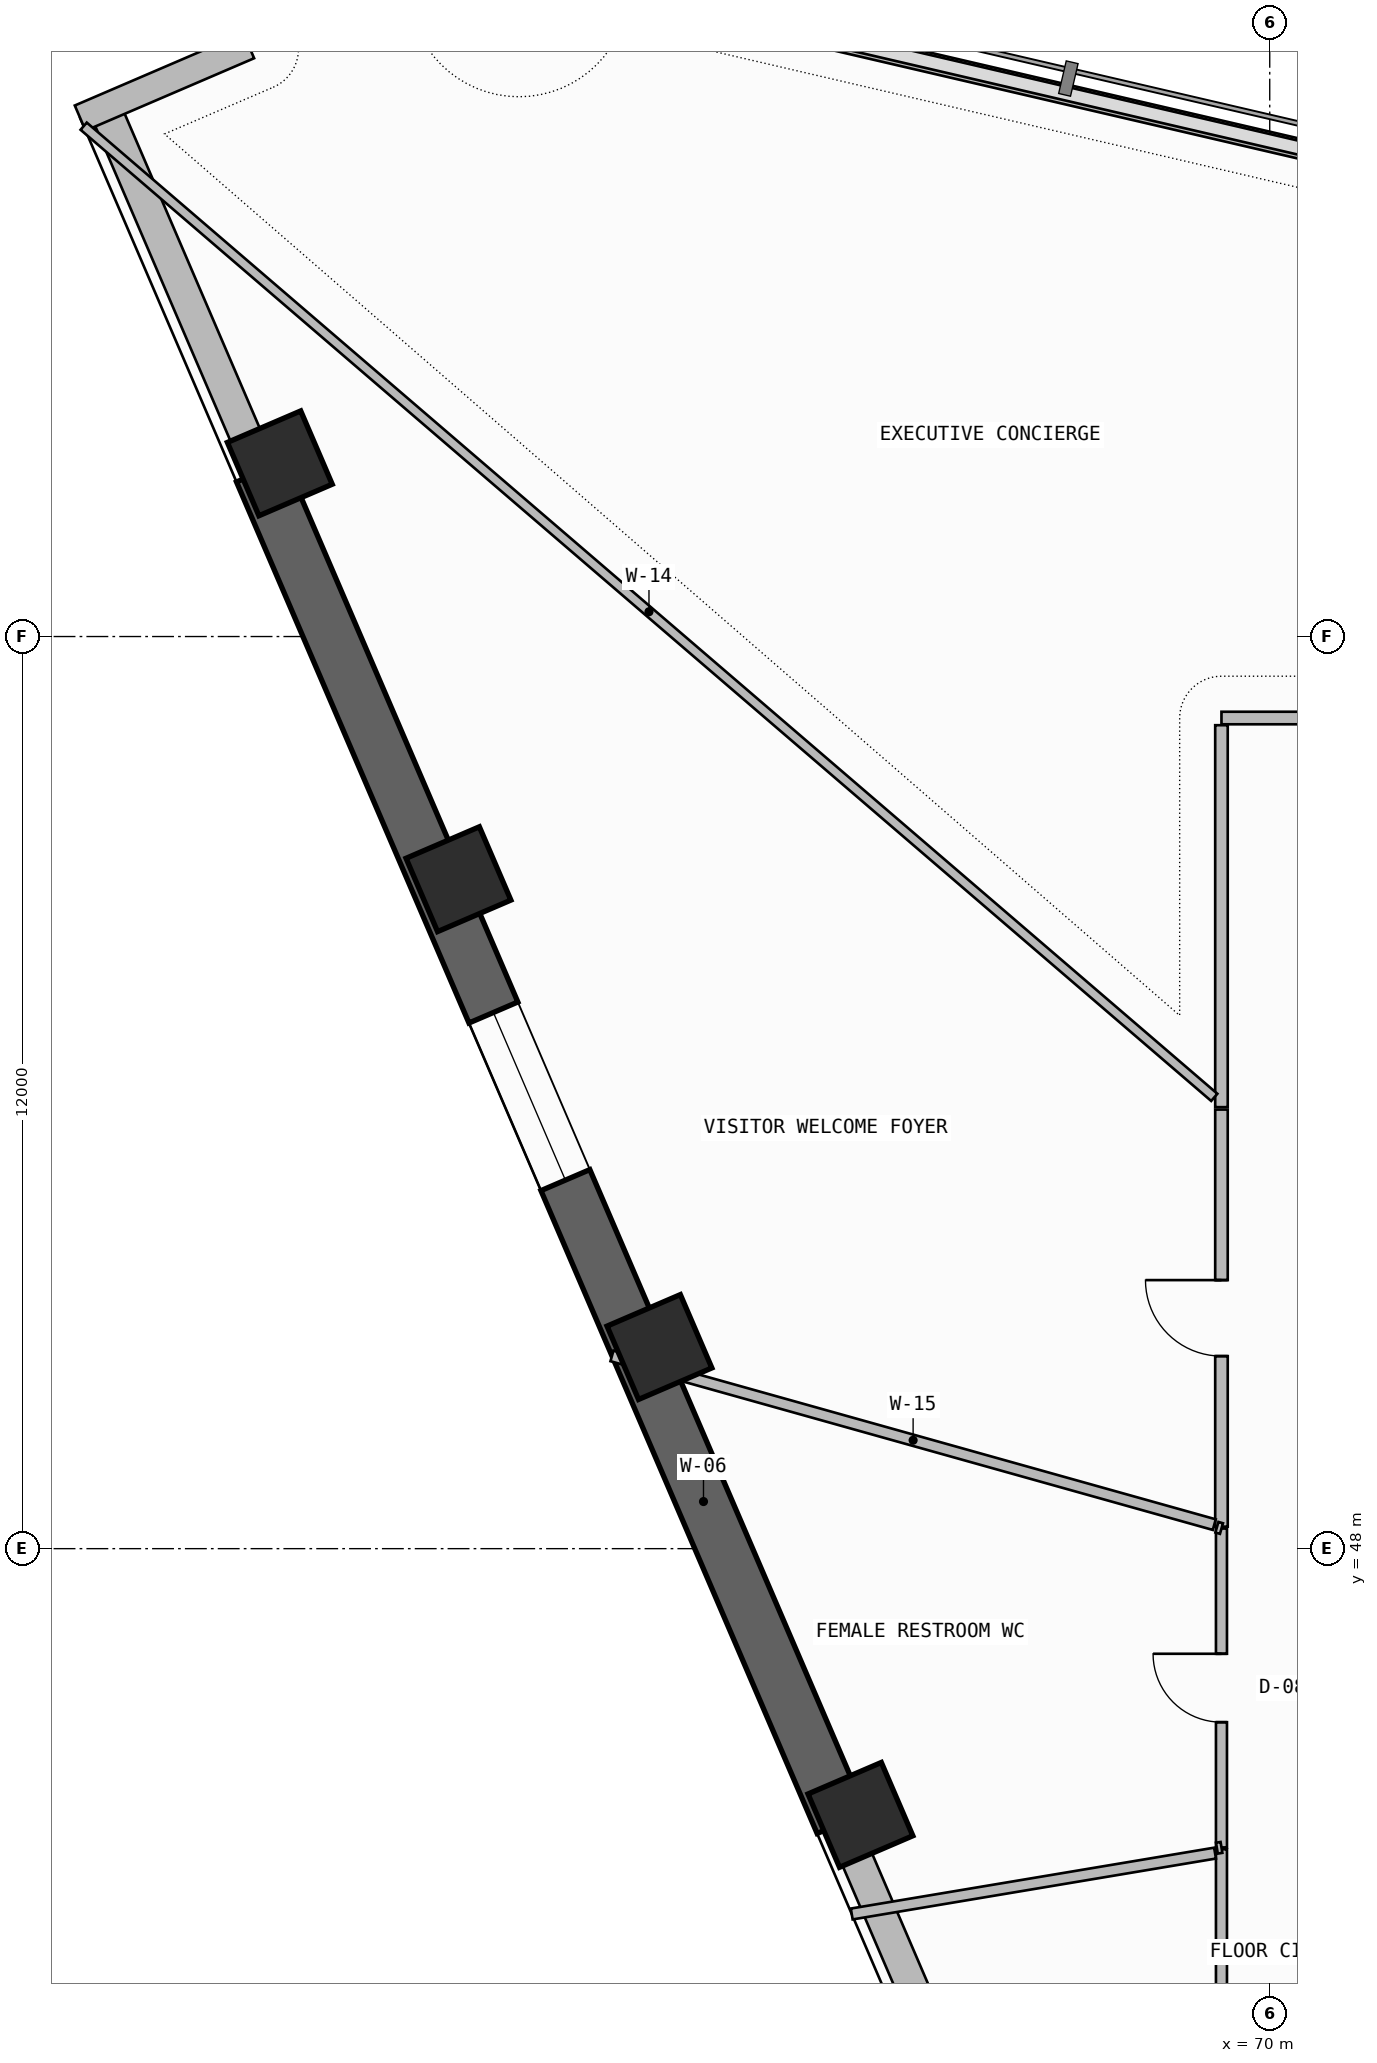
"""IFC4 building model, lengths in metres.
Left out: names, types, materials, properties, quantities, classifications, styles, units other than length and angle.
Written with IfcOpenShell. Run it as: python <this file> out.ifc"""

import sys

from ifc_helpers import new_model, si_unit, direction, frame, frame_2d, origin, origin_2d, place, context, subcontext, project, spatial, rectangle, extrude, element, fill, save


model = new_model("IFC4")
c1 = context("Model", 3, precision=1e-05, world=origin(), true_north=direction((0.0, 1.0)))
c2 = subcontext(c1, "Body", "Model", "MODEL_VIEW")
j1 = project(units=[si_unit("LENGTHUNIT", "METRE"), si_unit("PLANEANGLEUNIT", "RADIAN")], contexts=[c1])
p1 = place(None, origin())
s1 = spatial("IfcSite", under=j1, at=p1, CompositionType="ELEMENT")
p2 = place(p1, origin())
s2 = spatial("IfcBuilding", under=s1, at=p2, CompositionType="ELEMENT")
p3 = place(p2, frame((0.0, 0.0, 175.5)))
s3 = spatial("IfcBuildingStorey", under=s2, at=p3, CompositionType="ELEMENT", Elevation=175.5)
for number, where, z_axis, x_axis in (
    (1, (56.976, 62.279, 0.0), (0.0, 0.0, 1.0), (-0.395, 0.919, 0.0)),
    (2, (59.326, 56.807, 0.0), (0.0, 0.0, 1.0), (-0.395, 0.919, 0.0)),
    (3, (61.97, 50.653, 0.0), (0.0, 0.0, 1.0), (-0.395, 0.919, 0.0)),
    (4, (64.615, 44.498, 0.0), (0.0, 0.0, 1.0), (-0.395, 0.919, 0.0)),
):
    element("IfcColumn", number, at=place(p3, frame(where, z_axis=z_axis, x_axis=x_axis)), inside=s3, PredefinedType="COLUMN", context=c2, shape_type="SweptSolid", body=[
        extrude(rectangle(XDim=1.05, YDim=1.05, at=origin_2d()), origin(), (0.0, 0.0, 1.0), 3.6),
    ])
p4 = place(p3, frame((54.671, 66.959, 0.0), z_axis=(0.0, 0.0, 1.0), x_axis=(0.394733507229, -0.918795656428, 0.0)))
e5 = element("IfcWall", 5, at=p4, inside=s3, PredefinedType="SOLIDWALL", context=c2, shape_type="SweptSolid", body=[
    extrude(rectangle(XDim=5.21, YDim=0.42, at=frame_2d((2.605, 0.0))), origin(), (0.0, 0.0, 1.0), 2.725),
])
p5 = place(p3, frame((56.728, 62.172, -0.26), z_axis=(0.0, 0.0, 1.0), x_axis=(0.394736752992, -0.918794261974, 0.0)))
e6 = element("IfcWall", 6, at=p5, inside=s3, PredefinedType="SHEAR", context=c2, shape_type="SweptSolid", body=[
    extrude(rectangle(XDim=19.353, YDim=0.7, at=frame_2d((9.676, 0.0))), origin(), (0.0, 0.0, 1.0), 3.6),
])
p6 = place(p5, frame((7.747, 0.0, 1.2)))
e7 = element("IfcOpeningElement", 7, at=p6, cuts=e6, PredefinedType="OPENING", context=c2, shape_type="SweptSolid", body=[
    extrude(rectangle(XDim=2.4, YDim=0.9, at=frame_2d((1.2, 0.45))), frame((0.0, 0.36, 0.0), z_axis=(0.0, -1.0, 0.0), x_axis=(1.0, 0.0, 0.0)), (0.0, 0.0, 1.0), 0.72),
])
p7 = place(p3, frame((64.367, 44.391, 0.0), z_axis=(0.0, 0.0, 1.0), x_axis=(0.394757430431, -0.918785378159, 0.0)))
e8 = element("IfcWall", 8, at=p7, inside=s3, PredefinedType="SOLIDWALL", context=c2, shape_type="SweptSolid", body=[
    extrude(rectangle(XDim=12.654, YDim=0.42, at=frame_2d((6.327, 0.0))), origin(), (0.0, 0.0, 1.0), 2.725),
])
p8 = place(p7, frame((3.193, 0.0, 1.2)))
e9 = element("IfcOpeningElement", 9, at=p8, cuts=e8, PredefinedType="OPENING", context=c2, shape_type="SweptSolid", body=[
    extrude(rectangle(XDim=2.4, YDim=0.9, at=frame_2d((1.2, 0.45))), frame((0.0, 0.22, 0.0), z_axis=(0.0, -1.0, 0.0), x_axis=(1.0, 0.0, 0.0)), (0.0, 0.0, 1.0), 0.44),
])
p9 = place(p3, frame((56.566, 67.773, 0.0), z_axis=(0.0, 0.0, 1.0), x_axis=(-0.918788830096, -0.394749396062, 0.0)))
e10 = element("IfcWall", 10, at=p9, inside=s3, PredefinedType="SOLIDWALL", context=c2, shape_type="SweptSolid", body=[
    extrude(rectangle(XDim=2.413, YDim=0.36, at=frame_2d((1.207, 0.0))), origin(), (0.0, 0.0, 1.0), 3.34),
])
p10 = place(p3, frame((87.165, 62.482, 0.0), z_axis=(0.0, 0.0, 1.0), x_axis=(-0.973958631559, 0.226725790352, 0.0)))
e11 = element("IfcWall", 11, at=p10, inside=s3, PredefinedType="PARAPET", context=c2, shape_type="SweptSolid", body=[
    extrude(rectangle(XDim=27.376, YDim=0.2, at=frame_2d((13.688, 0.0))), origin(), (0.0, 0.0, 1.0), 1.15),
])
p11 = place(p3, frame((69.365, 44.045, 0.0), z_axis=(0.0, 0.0, 1.0), x_axis=(0.0, -1.0, 0.0)))
e12 = element("IfcWall", 12, at=p11, inside=s3, PredefinedType="PARTITIONING", context=c2, shape_type="SweptSolid", body=[
    extrude(rectangle(XDim=7.995, YDim=0.145, at=frame_2d((3.997, 0.0))), origin(), (0.0, 0.0, 1.0), 3.34),
])
p12 = place(p11, frame((2.543, 0.0, 0.0)))
e13 = element("IfcOpeningElement", 13, at=p12, cuts=e12, PredefinedType="OPENING", context=c2, shape_type="SweptSolid", body=[
    extrude(rectangle(XDim=0.9, YDim=2.1, at=frame_2d((0.45, 1.05))), frame((0.0, 0.083, 0.0), z_axis=(0.0, -1.0, 0.0), x_axis=(1.0, 0.0, 0.0)), (0.0, 0.0, 1.0), 0.165),
])
p13 = place(p3, frame((64.5, 43.194, 0.0), z_axis=(0.0, 0.0, 1.0), x_axis=(0.986257448723, 0.165215752391, 0.0)))
e14 = element("IfcWall", 14, at=p13, inside=s3, PredefinedType="PARTITIONING", context=c2, shape_type="SweptSolid", body=[
    extrude(rectangle(XDim=4.847, YDim=0.145, at=frame_2d((2.423, 0.0))), origin(), (0.0, 0.0, 1.0), 3.34),
])
p14 = place(p3, frame((77.644, 58.928, 0.0), z_axis=(0.0, 0.0, 1.0), x_axis=(-1.0, 0.0, 0.0)))
e15 = element("IfcWall", 15, at=p14, inside=s3, PredefinedType="PARTITIONING", context=c2, shape_type="SweptSolid", body=[
    extrude(rectangle(XDim=8.279, YDim=0.165, at=frame_2d((4.14, 0.0))), origin(), (0.0, 0.0, 1.0), 2.825),
])
p15 = place(p14, frame((2.608, 0.0, 0.0)))
e16 = element("IfcOpeningElement", 16, at=p15, cuts=e15, PredefinedType="OPENING", context=c2, shape_type="SweptSolid", body=[
    extrude(rectangle(XDim=1.0, YDim=2.2, at=frame_2d((0.5, 1.1))), frame((0.0, 0.093, 0.0), z_axis=(0.0, -1.0, 0.0), x_axis=(1.0, 0.0, 0.0)), (0.0, 0.0, 1.0), 0.185),
])
p16 = place(p3, frame((69.365, 58.833, 0.0), z_axis=(0.0, 0.0, 1.0), x_axis=(0.0, -1.0, 0.0)))
e17 = element("IfcWall", 17, at=p16, inside=s3, PredefinedType="PARTITIONING", context=c2, shape_type="SweptSolid", body=[
    extrude(rectangle(XDim=5.025, YDim=0.165, at=frame_2d((2.513, 0.0))), origin(), (0.0, 0.0, 1.0), 2.825),
])
p17 = place(p3, frame((69.271, 53.937, 0.0), z_axis=(0.0, 0.0, 1.0), x_axis=(-0.758583892444, 0.651575381767, 0.0)))
e18 = element("IfcWall", 18, at=p17, inside=s3, PredefinedType="PARTITIONING", context=c2, shape_type="SweptSolid", body=[
    extrude(rectangle(XDim=19.61, YDim=0.125, at=frame_2d((9.805, 0.0))), origin(), (0.0, 0.0, 1.0), 2.725),
])
p18 = place(p3, frame((69.365, 53.777, 0.0), z_axis=(0.0, 0.0, 1.0), x_axis=(0.0, -1.0, 0.0)))
e19 = element("IfcWall", 19, at=p18, inside=s3, PredefinedType="PARTITIONING", context=c2, shape_type="SweptSolid", body=[
    extrude(rectangle(XDim=5.487, YDim=0.165, at=frame_2d((2.744, 0.0))), origin(), (0.0, 0.0, 1.0), 2.825),
])
p19 = place(p18, frame((2.243, 0.0, 0.0)))
e20 = element("IfcOpeningElement", 20, at=p19, cuts=e19, PredefinedType="OPENING", context=c2, shape_type="SweptSolid", body=[
    extrude(rectangle(XDim=1.0, YDim=2.2, at=frame_2d((0.5, 1.1))), frame((0.0, 0.093, 0.0), z_axis=(0.0, -1.0, 0.0), x_axis=(1.0, 0.0, 0.0)), (0.0, 0.0, 1.0), 0.185),
])
p20 = place(p3, frame((69.271, 48.316, 0.0), z_axis=(0.0, 0.0, 1.0), x_axis=(-0.962939367868, 0.269717952331, 0.0)))
e21 = element("IfcWall", 21, at=p20, inside=s3, PredefinedType="PARTITIONING", context=c2, shape_type="SweptSolid", body=[
    extrude(rectangle(XDim=8.23, YDim=0.145, at=frame_2d((4.115, 0.0))), origin(), (0.0, 0.0, 1.0), 2.725),
])
p21 = place(p3, frame((69.365, 48.265, 0.0), z_axis=(0.0, 0.0, 1.0), x_axis=(0.0, -1.0, 0.0)))
e22 = element("IfcWall", 22, at=p21, inside=s3, PredefinedType="PARTITIONING", context=c2, shape_type="SweptSolid", body=[
    extrude(rectangle(XDim=4.195, YDim=0.145, at=frame_2d((2.098, 0.0))), origin(), (0.0, 0.0, 1.0), 3.34),
])
p22 = place(p21, frame((1.648, 0.0, 0.0)))
e23 = element("IfcOpeningElement", 23, at=p22, cuts=e22, PredefinedType="OPENING", context=c2, shape_type="SweptSolid", body=[
    extrude(rectangle(XDim=0.9, YDim=2.1, at=frame_2d((0.45, 1.05))), frame((0.0, 0.083, 0.0), z_axis=(0.0, -1.0, 0.0), x_axis=(1.0, 0.0, 0.0)), (0.0, 0.0, 1.0), 0.165),
])
p23 = place(p3, frame((69.305, 48.282, 0.0), z_axis=(0.0, 0.0, 1.0), x_axis=(0.961818474576, -0.273688183822, 0.0)))
e24 = element("IfcWall", 24, at=p23, inside=s3, PredefinedType="PARTITIONING", context=c2, shape_type="SweptSolid", body=[
    extrude(rectangle(XDim=0.062, YDim=0.145, at=frame_2d((0.031, 0.0))), origin(), (0.0, 0.0, 1.0), 3.34),
])
p24 = place(p3, frame((69.365, 44.069, 0.0), z_axis=(0.0, 0.0, 1.0), x_axis=(-0.987036848987, -0.160493796583, 0.0)))
e25 = element("IfcWall", 25, at=p24, inside=s3, PredefinedType="PARTITIONING", context=c2, shape_type="SweptSolid", body=[
    extrude(rectangle(XDim=0.061, YDim=0.145, at=frame_2d((0.03, 0.0))), origin(), (0.0, 0.0, 1.0), 3.34),
])
p25 = place(p6, origin())
e26 = element("IfcWindow", 26, at=p25, inside=s3, PartitioningType="SINGLE_PANEL", PredefinedType="WINDOW", context=c2, shape_type="SweptSolid", body=[
    extrude(rectangle(XDim=2.4, YDim=0.9, at=frame_2d((1.2, 0.45))), frame((0.0, 0.03, 0.0), z_axis=(0.0, -1.0, 0.0), x_axis=(1.0, 0.0, 0.0)), (0.0, 0.0, 1.0), 0.06),
])
fill(e7, e26)
p26 = place(p19, frame((1.0, 0.0, 0.0), z_axis=(0.0, 0.0, 1.0), x_axis=(-1.0, 0.0, 0.0)))
e27 = element("IfcDoor", 27, at=p26, inside=s3, OperationType="SINGLE_SWING_RIGHT", PredefinedType="DOOR", context=c2, shape_type="SweptSolid", body=[
    extrude(rectangle(XDim=1.0, YDim=2.2, at=frame_2d((0.5, 1.1))), frame((0.0, 0.025, 0.0), z_axis=(0.0, -1.0, 0.0), x_axis=(1.0, 0.0, 0.0)), (0.0, 0.0, 1.0), 0.05),
])
fill(e20, e27)
p27 = place(p22, frame((0.9, 0.0, 0.0), z_axis=(0.0, 0.0, 1.0), x_axis=(-1.0, 0.0, 0.0)))
e28 = element("IfcDoor", 28, at=p27, inside=s3, OperationType="SINGLE_SWING_RIGHT", PredefinedType="DOOR", context=c2, shape_type="SweptSolid", body=[
    extrude(rectangle(XDim=0.9, YDim=2.1, at=frame_2d((0.45, 1.05))), frame((0.0, 0.025, 0.0), z_axis=(0.0, -1.0, 0.0), x_axis=(1.0, 0.0, 0.0)), (0.0, 0.0, 1.0), 0.05),
])
fill(e23, e28)
save(model, sys.argv[1])
